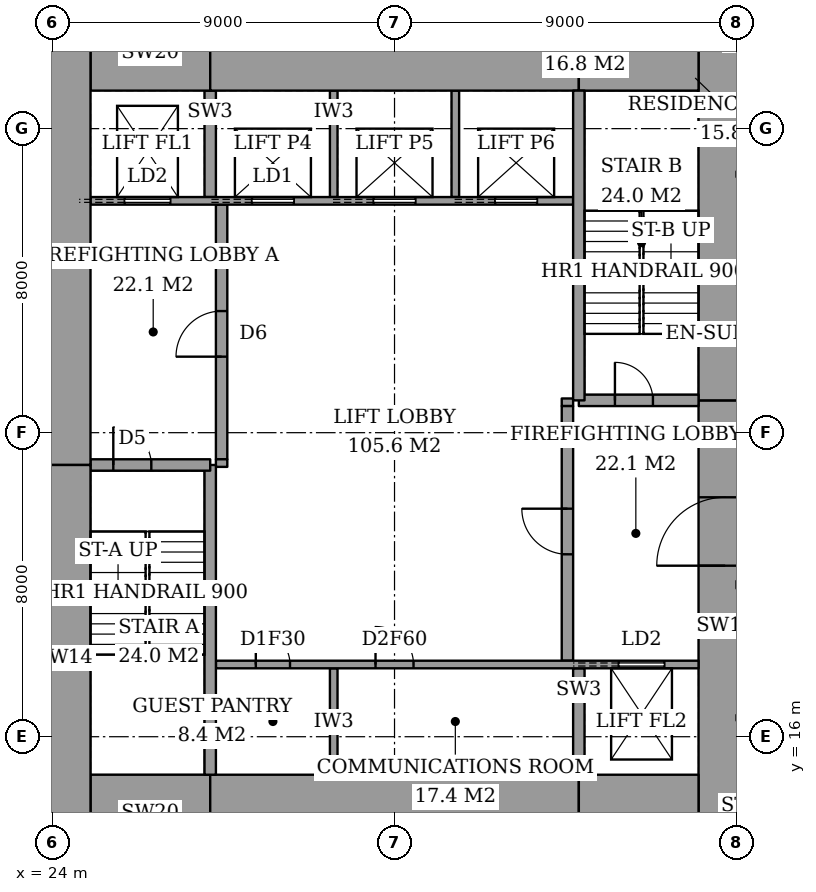
"""IFC4 building model, lengths in metres.
Left out: names, types, materials, properties, quantities, classifications, styles, units other than length and angle.
Written with IfcOpenShell. Run it as: python <this file> out.ifc"""

import sys

from ifc_helpers import new_model, si_unit, direction, frame, frame_2d, origin, place, context, subcontext, project, spatial, rectangle, extrude, element, fill, save


model = new_model("IFC4")
c1 = context("Model", 3, precision=1e-05, world=origin(), true_north=direction((0.0, 1.0)))
c2 = subcontext(c1, "Body", "Model", "MODEL_VIEW")
j1 = project(units=[si_unit("LENGTHUNIT", "METRE"), si_unit("PLANEANGLEUNIT", "RADIAN")], contexts=[c1])
p1 = place(None, origin())
s1 = spatial("IfcSite", under=j1, at=p1, CompositionType="ELEMENT")
p2 = place(p1, origin())
s2 = spatial("IfcBuilding", under=s1, at=p2, CompositionType="ELEMENT")
p3 = place(p2, frame((0.0, 0.0, 282.6)))
s3 = spatial("IfcBuildingStorey", under=s2, at=p3, CompositionType="ELEMENT", Elevation=282.6)
p4 = place(p3, frame((25.0, 14.0, 0.0), z_axis=(0.0, 0.0, 1.0), x_axis=(1.0, 0.0, 0.0)))
e1 = element("IfcWall", 1, at=p4, inside=s3, PredefinedType="SHEAR", context=c2, shape_type="SweptSolid", body=[
    extrude(rectangle(XDim=3.15, YDim=2.0, at=frame_2d((1.575, 0.0))), origin(), (0.0, 0.0, 1.0), 4.5),
])
p5 = place(p3, frame((28.15, 14.0, 0.0), z_axis=(0.0, 0.0, 1.0), x_axis=(1.0, 0.0, 0.0)))
e2 = element("IfcWall", 2, at=p5, inside=s3, PredefinedType="SHEAR", context=c2, shape_type="SweptSolid", body=[
    extrude(rectangle(XDim=9.7, YDim=2.0, at=frame_2d((4.85, 0.0))), origin(), (0.0, 0.0, 1.0), 4.5),
])
for number, where, z_axis, x_axis in (
    (3, (37.85, 14.0, 0.0), (0.0, 0.0, 1.0), (1.0, 0.0, 0.0)),
    (4, (25.0, 34.0, 0.0), (0.0, 0.0, 1.0), (1.0, 0.0, 0.0)),
):
    element("IfcWall", number, at=place(p3, frame(where, z_axis=z_axis, x_axis=x_axis)), inside=s3, PredefinedType="SHEAR", context=c2, shape_type="SweptSolid", body=[
        extrude(rectangle(XDim=3.15, YDim=2.0, at=frame_2d((1.575, 0.0))), origin(), (0.0, 0.0, 1.0), 4.5),
    ])
p6 = place(p3, frame((28.15, 34.0, 0.0), z_axis=(0.0, 0.0, 1.0), x_axis=(1.0, 0.0, 0.0)))
e5 = element("IfcWall", 5, at=p6, inside=s3, PredefinedType="SHEAR", context=c2, shape_type="SweptSolid", body=[
    extrude(rectangle(XDim=9.7, YDim=2.0, at=frame_2d((4.85, 0.0))), origin(), (0.0, 0.0, 1.0), 4.5),
])
p7 = place(p3, frame((37.85, 34.0, 0.0), z_axis=(0.0, 0.0, 1.0), x_axis=(1.0, 0.0, 0.0)))
e6 = element("IfcWall", 6, at=p7, inside=s3, PredefinedType="SHEAR", context=c2, shape_type="SweptSolid", body=[
    extrude(rectangle(XDim=3.15, YDim=2.0, at=frame_2d((1.575, 0.0))), origin(), (0.0, 0.0, 1.0), 4.5),
])
p8 = place(p3, frame((24.3, 13.0, 0.0), z_axis=(0.0, 0.0, 1.0), x_axis=(0.0, 1.0, 0.0)))
e7 = element("IfcWall", 7, at=p8, inside=s3, PredefinedType="SHEAR", context=c2, shape_type="SweptSolid", body=[
    extrude(rectangle(XDim=10.15, YDim=1.4, at=frame_2d((5.075, 0.0))), origin(), (0.0, 0.0, 1.0), 4.5),
])
p9 = place(p3, frame((24.3, 23.15, 0.0), z_axis=(0.0, 0.0, 1.0), x_axis=(0.0, 1.0, 0.0)))
e8 = element("IfcWall", 8, at=p9, inside=s3, PredefinedType="SHEAR", context=c2, shape_type="SweptSolid", body=[
    extrude(rectangle(XDim=11.85, YDim=1.4, at=frame_2d((5.925, 0.0))), origin(), (0.0, 0.0, 1.0), 4.5),
])
p10 = place(p3, frame((41.7, 13.0, 0.0), z_axis=(0.0, 0.0, 1.0), x_axis=(0.0, 1.0, 0.0)))
e9 = element("IfcWall", 9, at=p10, inside=s3, PredefinedType="SHEAR", context=c2, shape_type="SweptSolid", body=[
    extrude(rectangle(XDim=11.85, YDim=1.4, at=frame_2d((5.925, 0.0))), origin(), (0.0, 0.0, 1.0), 4.5),
])
p11 = place(p10, frame((7.5, 0.0, 0.0)))
e10 = element("IfcOpeningElement", 10, at=p11, cuts=e9, PredefinedType="OPENING", context=c2, shape_type="SweptSolid", body=[
    extrude(rectangle(XDim=1.8, YDim=2.4, at=frame_2d((0.9, 1.2))), frame((0.0, 0.71, 0.0), z_axis=(0.0, -1.0, 0.0), x_axis=(1.0, 0.0, 0.0)), (0.0, 0.0, 1.0), 1.42),
])
p12 = place(p3, frame((41.7, 24.85, 0.0), z_axis=(0.0, 0.0, 1.0), x_axis=(0.0, 1.0, 0.0)))
e11 = element("IfcWall", 11, at=p12, inside=s3, PredefinedType="SHEAR", context=c2, shape_type="SweptSolid", body=[
    extrude(rectangle(XDim=10.15, YDim=1.4, at=frame_2d((5.075, 0.0))), origin(), (0.0, 0.0, 1.0), 4.5),
])
p13 = place(p3, frame((28.15, 15.0, 0.0), z_axis=(0.0, 0.0, 1.0), x_axis=(0.0, 1.0, 0.0)))
e12 = element("IfcWall", 12, at=p13, inside=s3, PredefinedType="SHEAR", context=c2, shape_type="SweptSolid", body=[
    extrude(rectangle(XDim=8.15, YDim=0.3, at=frame_2d((4.075, 0.0))), origin(), (0.0, 0.0, 1.0), 4.5),
])
p14 = place(p3, frame((25.0, 23.15, 0.0), z_axis=(0.0, 0.0, 1.0), x_axis=(1.0, 0.0, 0.0)))
e13 = element("IfcWall", 13, at=p14, inside=s3, PredefinedType="SHEAR", context=c2, shape_type="SweptSolid", body=[
    extrude(rectangle(XDim=3.15, YDim=0.3, at=frame_2d((1.575, 0.0))), origin(), (0.0, 0.0, 1.0), 4.5),
])
p15 = place(p14, frame((0.6, 0.0, 0.0)))
e14 = element("IfcOpeningElement", 14, at=p15, cuts=e13, PredefinedType="OPENING", context=c2, shape_type="SweptSolid", body=[
    extrude(rectangle(XDim=1.0, YDim=2.1, at=frame_2d((0.5, 1.05))), frame((0.0, 0.16, 0.0), z_axis=(0.0, -1.0, 0.0), x_axis=(1.0, 0.0, 0.0)), (0.0, 0.0, 1.0), 0.32),
])
p16 = place(p3, frame((37.85, 24.85, 0.0), z_axis=(0.0, 0.0, 1.0), x_axis=(0.0, 1.0, 0.0)))
e15 = element("IfcWall", 15, at=p16, inside=s3, PredefinedType="SHEAR", context=c2, shape_type="SweptSolid", body=[
    extrude(rectangle(XDim=8.15, YDim=0.3, at=frame_2d((4.075, 0.0))), origin(), (0.0, 0.0, 1.0), 4.5),
])
p17 = place(p3, frame((37.85, 24.85, 0.0), z_axis=(0.0, 0.0, 1.0), x_axis=(1.0, 0.0, 0.0)))
e16 = element("IfcWall", 16, at=p17, inside=s3, PredefinedType="SHEAR", context=c2, shape_type="SweptSolid", body=[
    extrude(rectangle(XDim=3.15, YDim=0.3, at=frame_2d((1.575, 0.0))), origin(), (0.0, 0.0, 1.0), 4.5),
])
p18 = place(p17, frame((0.95, 0.0, 0.0)))
e17 = element("IfcOpeningElement", 17, at=p18, cuts=e16, PredefinedType="OPENING", context=c2, shape_type="SweptSolid", body=[
    extrude(rectangle(XDim=1.0, YDim=2.1, at=frame_2d((0.5, 1.05))), frame((0.0, 0.16, 0.0), z_axis=(0.0, -1.0, 0.0), x_axis=(1.0, 0.0, 0.0)), (0.0, 0.0, 1.0), 0.32),
])
p19 = place(p3, frame((28.45, 23.3, 0.0), z_axis=(0.0, 0.0, 1.0), x_axis=(0.0, 1.0, 0.0)))
e18 = element("IfcWall", 18, at=p19, inside=s3, PredefinedType="PARTITIONING", context=c2, shape_type="SweptSolid", body=[
    extrude(rectangle(XDim=6.7, YDim=0.3, at=frame_2d((3.35, 0.0))), origin(), (0.0, 0.0, 1.0), 4.5),
])
p20 = place(p19, frame((2.7, 0.0, 0.0)))
e19 = element("IfcOpeningElement", 19, at=p20, cuts=e18, PredefinedType="OPENING", context=c2, shape_type="SweptSolid", body=[
    extrude(rectangle(XDim=1.2, YDim=2.1, at=frame_2d((0.6, 1.05))), frame((0.0, 0.16, 0.0), z_axis=(0.0, -1.0, 0.0), x_axis=(1.0, 0.0, 0.0)), (0.0, 0.0, 1.0), 0.32),
])
p21 = place(p3, frame((37.55, 18.0, 0.0), z_axis=(0.0, 0.0, 1.0), x_axis=(0.0, 1.0, 0.0)))
e20 = element("IfcWall", 20, at=p21, inside=s3, PredefinedType="PARTITIONING", context=c2, shape_type="SweptSolid", body=[
    extrude(rectangle(XDim=6.7, YDim=0.3, at=frame_2d((3.35, 0.0))), origin(), (0.0, 0.0, 1.0), 4.5),
])
p22 = place(p21, frame((2.8, 0.0, 0.0)))
e21 = element("IfcOpeningElement", 21, at=p22, cuts=e20, PredefinedType="OPENING", context=c2, shape_type="SweptSolid", body=[
    extrude(rectangle(XDim=1.2, YDim=2.1, at=frame_2d((0.6, 1.05))), frame((0.0, 0.16, 0.0), z_axis=(0.0, -1.0, 0.0), x_axis=(1.0, 0.0, 0.0)), (0.0, 0.0, 1.0), 0.32),
])
p23 = place(p3, frame((28.3, 17.9, 0.0), z_axis=(0.0, 0.0, 1.0), x_axis=(1.0, 0.0, 0.0)))
e22 = element("IfcWall", 22, at=p23, inside=s3, PredefinedType="PARTITIONING", context=c2, shape_type="SweptSolid", body=[
    extrude(rectangle(XDim=12.7, YDim=0.2, at=frame_2d((6.35, 0.0))), origin(), (0.0, 0.0, 1.0), 4.5),
])
p24 = place(p23, frame((1.05, 0.0, 0.0)))
e23 = element("IfcOpeningElement", 23, at=p24, cuts=e22, PredefinedType="OPENING", context=c2, shape_type="SweptSolid", body=[
    extrude(rectangle(XDim=0.9, YDim=2.1, at=frame_2d((0.45, 1.05))), frame((0.0, 0.11, 0.0), z_axis=(0.0, -1.0, 0.0), x_axis=(1.0, 0.0, 0.0)), (0.0, 0.0, 1.0), 0.22),
])
p25 = place(p23, frame((4.2, 0.0, 0.0)))
e24 = element("IfcOpeningElement", 24, at=p25, cuts=e22, PredefinedType="OPENING", context=c2, shape_type="SweptSolid", body=[
    extrude(rectangle(XDim=1.0, YDim=2.1, at=frame_2d((0.5, 1.05))), frame((0.0, 0.11, 0.0), z_axis=(0.0, -1.0, 0.0), x_axis=(1.0, 0.0, 0.0)), (0.0, 0.0, 1.0), 0.22),
])
p26 = place(p23, frame((10.6, 0.0, 0.0)))
e25 = element("IfcOpeningElement", 25, at=p26, cuts=e22, PredefinedType="OPENING", context=c2, shape_type="SweptSolid", body=[
    extrude(rectangle(XDim=1.2, YDim=2.1, at=frame_2d((0.6, 1.05))), frame((0.0, 0.11, 0.0), z_axis=(0.0, -1.0, 0.0), x_axis=(1.0, 0.0, 0.0)), (0.0, 0.0, 1.0), 0.22),
])
p27 = place(p3, frame((25.0, 30.1, 0.0), z_axis=(0.0, 0.0, 1.0), x_axis=(1.0, 0.0, 0.0)))
e26 = element("IfcWall", 26, at=p27, inside=s3, PredefinedType="PARTITIONING", context=c2, shape_type="SweptSolid", body=[
    extrude(rectangle(XDim=12.7, YDim=0.2, at=frame_2d((6.35, 0.0))), origin(), (0.0, 0.0, 1.0), 4.5),
])
p28 = place(p27, frame((4.25, 0.0, 0.0)))
e27 = element("IfcOpeningElement", 27, at=p28, cuts=e26, PredefinedType="OPENING", context=c2, shape_type="SweptSolid", body=[
    extrude(rectangle(XDim=1.1, YDim=2.1, at=frame_2d((0.55, 1.05))), frame((0.0, 0.11, 0.0), z_axis=(0.0, -1.0, 0.0), x_axis=(1.0, 0.0, 0.0)), (0.0, 0.0, 1.0), 0.22),
])
p29 = place(p27, frame((7.45, 0.0, 0.0)))
e28 = element("IfcOpeningElement", 28, at=p29, cuts=e26, PredefinedType="OPENING", context=c2, shape_type="SweptSolid", body=[
    extrude(rectangle(XDim=1.1, YDim=2.1, at=frame_2d((0.55, 1.05))), frame((0.0, 0.11, 0.0), z_axis=(0.0, -1.0, 0.0), x_axis=(1.0, 0.0, 0.0)), (0.0, 0.0, 1.0), 0.22),
])
p30 = place(p27, frame((10.65, 0.0, 0.0)))
e29 = element("IfcOpeningElement", 29, at=p30, cuts=e26, PredefinedType="OPENING", context=c2, shape_type="SweptSolid", body=[
    extrude(rectangle(XDim=1.1, YDim=2.1, at=frame_2d((0.55, 1.05))), frame((0.0, 0.11, 0.0), z_axis=(0.0, -1.0, 0.0), x_axis=(1.0, 0.0, 0.0)), (0.0, 0.0, 1.0), 0.22),
])
p31 = place(p27, frame((0.9, 0.0, 0.0)))
e30 = element("IfcOpeningElement", 30, at=p31, cuts=e26, PredefinedType="OPENING", context=c2, shape_type="SweptSolid", body=[
    extrude(rectangle(XDim=1.2, YDim=2.1, at=frame_2d((0.6, 1.05))), frame((0.0, 0.11, 0.0), z_axis=(0.0, -1.0, 0.0), x_axis=(1.0, 0.0, 0.0)), (0.0, 0.0, 1.0), 0.22),
])
p32 = place(p3, frame((31.4, 15.0, 0.0), z_axis=(0.0, 0.0, 1.0), x_axis=(0.0, 1.0, 0.0)))
e31 = element("IfcWall", 31, at=p32, inside=s3, PredefinedType="PARTITIONING", context=c2, shape_type="SweptSolid", body=[
    extrude(rectangle(XDim=2.8, YDim=0.2, at=frame_2d((1.4, 0.0))), origin(), (0.0, 0.0, 1.0), 4.5),
])
p33 = place(p3, frame((37.85, 15.0, 0.0), z_axis=(0.0, 0.0, 1.0), x_axis=(0.0, 1.0, 0.0)))
e32 = element("IfcWall", 32, at=p33, inside=s3, PredefinedType="SHEAR", context=c2, shape_type="SweptSolid", body=[
    extrude(rectangle(XDim=2.8, YDim=0.3, at=frame_2d((1.4, 0.0))), origin(), (0.0, 0.0, 1.0), 4.5),
])
for number, where, z_axis, x_axis in (
    (33, (31.4, 30.2, 0.0), (0.0, 0.0, 1.0), (0.0, 1.0, 0.0)),
    (34, (34.6, 30.2, 0.0), (0.0, 0.0, 1.0), (0.0, 1.0, 0.0)),
):
    element("IfcWall", number, at=place(p3, frame(where, z_axis=z_axis, x_axis=x_axis)), inside=s3, PredefinedType="PARTITIONING", context=c2, shape_type="SweptSolid", body=[
        extrude(rectangle(XDim=2.8, YDim=0.2, at=frame_2d((1.4, 0.0))), origin(), (0.0, 0.0, 1.0), 4.5),
    ])
p34 = place(p3, frame((28.15, 30.2, 0.0), z_axis=(0.0, 0.0, 1.0), x_axis=(0.0, 1.0, 0.0)))
e35 = element("IfcWall", 35, at=p34, inside=s3, PredefinedType="SHEAR", context=c2, shape_type="SweptSolid", body=[
    extrude(rectangle(XDim=2.8, YDim=0.3, at=frame_2d((1.4, 0.0))), origin(), (0.0, 0.0, 1.0), 4.5),
])
for number, where, z_axis, x_axis in (
    (36, (28.3, 23.2, 0.0), (0.0, 0.0, 1.0), (1.0, 0.0, 0.0)),
    (37, (37.4, 24.8, 0.0), (0.0, 0.0, 1.0), (1.0, 0.0, 0.0)),
):
    element("IfcWall", number, at=place(p3, frame(where, z_axis=z_axis, x_axis=x_axis)), inside=s3, PredefinedType="PARTITIONING", context=c2, shape_type="SweptSolid", body=[
        extrude(rectangle(XDim=0.3, YDim=0.2, at=frame_2d((0.15, 0.0))), origin(), (0.0, 0.0, 1.0), 4.5),
    ])
p35 = place(p15, origin())
e38 = element("IfcDoor", 38, at=p35, inside=s3, OperationType="SINGLE_SWING_RIGHT", PredefinedType="DOOR", context=c2, shape_type="SweptSolid", body=[
    extrude(rectangle(XDim=1.0, YDim=2.1, at=frame_2d((0.5, 1.05))), frame((0.0, 0.025, 0.0), z_axis=(0.0, -1.0, 0.0), x_axis=(1.0, 0.0, 0.0)), (0.0, 0.0, 1.0), 0.05),
])
fill(e14, e38)
p36 = place(p18, origin())
e39 = element("IfcDoor", 39, at=p36, inside=s3, OperationType="SINGLE_SWING_RIGHT", PredefinedType="DOOR", context=c2, shape_type="SweptSolid", body=[
    extrude(rectangle(XDim=1.0, YDim=2.1, at=frame_2d((0.5, 1.05))), frame((0.0, 0.025, 0.0), z_axis=(0.0, -1.0, 0.0), x_axis=(1.0, 0.0, 0.0)), (0.0, 0.0, 1.0), 0.05),
])
fill(e17, e39)
p37 = place(p20, origin())
e40 = element("IfcDoor", 40, at=p37, inside=s3, OperationType="SINGLE_SWING_RIGHT", PredefinedType="DOOR", context=c2, shape_type="SweptSolid", body=[
    extrude(rectangle(XDim=1.2, YDim=2.1, at=frame_2d((0.6, 1.05))), frame((0.0, 0.025, 0.0), z_axis=(0.0, -1.0, 0.0), x_axis=(1.0, 0.0, 0.0)), (0.0, 0.0, 1.0), 0.05),
])
fill(e19, e40)
p38 = place(p22, origin())
e41 = element("IfcDoor", 41, at=p38, inside=s3, OperationType="SINGLE_SWING_LEFT", PredefinedType="DOOR", context=c2, shape_type="SweptSolid", body=[
    extrude(rectangle(XDim=1.2, YDim=2.1, at=frame_2d((0.6, 1.05))), frame((0.0, 0.025, 0.0), z_axis=(0.0, -1.0, 0.0), x_axis=(1.0, 0.0, 0.0)), (0.0, 0.0, 1.0), 0.05),
])
fill(e21, e41)
p39 = place(p11, origin())
e42 = element("IfcDoor", 42, at=p39, inside=s3, OperationType="DOUBLE_DOOR_DOUBLE_SWING", PredefinedType="DOOR", context=c2, shape_type="SweptSolid", body=[
    extrude(rectangle(XDim=1.8, YDim=2.4, at=frame_2d((0.9, 1.2))), frame((0.0, 0.025, 0.0), z_axis=(0.0, -1.0, 0.0), x_axis=(1.0, 0.0, 0.0)), (0.0, 0.0, 1.0), 0.05),
])
fill(e10, e42)
p40 = place(p24, origin())
e43 = element("IfcDoor", 43, at=p40, inside=s3, OperationType="SINGLE_SWING_RIGHT", PredefinedType="DOOR", context=c2, shape_type="SweptSolid", body=[
    extrude(rectangle(XDim=0.9, YDim=2.1, at=frame_2d((0.45, 1.05))), frame((0.0, 0.025, 0.0), z_axis=(0.0, -1.0, 0.0), x_axis=(1.0, 0.0, 0.0)), (0.0, 0.0, 1.0), 0.05),
])
fill(e23, e43)
p41 = place(p25, origin())
e44 = element("IfcDoor", 44, at=p41, inside=s3, OperationType="SINGLE_SWING_RIGHT", PredefinedType="DOOR", context=c2, shape_type="SweptSolid", body=[
    extrude(rectangle(XDim=1.0, YDim=2.1, at=frame_2d((0.5, 1.05))), frame((0.0, 0.025, 0.0), z_axis=(0.0, -1.0, 0.0), x_axis=(1.0, 0.0, 0.0)), (0.0, 0.0, 1.0), 0.05),
])
fill(e24, e44)
p42 = place(p28, origin())
e45 = element("IfcDoor", 45, at=p42, inside=s3, OperationType="SLIDING_TO_LEFT", PredefinedType="DOOR", context=c2, shape_type="SweptSolid", body=[
    extrude(rectangle(XDim=1.1, YDim=2.1, at=frame_2d((0.55, 1.05))), frame((0.0, 0.025, 0.0), z_axis=(0.0, -1.0, 0.0), x_axis=(1.0, 0.0, 0.0)), (0.0, 0.0, 1.0), 0.05),
])
fill(e27, e45)
p43 = place(p29, origin())
e46 = element("IfcDoor", 46, at=p43, inside=s3, OperationType="SLIDING_TO_LEFT", PredefinedType="DOOR", context=c2, shape_type="SweptSolid", body=[
    extrude(rectangle(XDim=1.1, YDim=2.1, at=frame_2d((0.55, 1.05))), frame((0.0, 0.025, 0.0), z_axis=(0.0, -1.0, 0.0), x_axis=(1.0, 0.0, 0.0)), (0.0, 0.0, 1.0), 0.05),
])
fill(e28, e46)
p44 = place(p30, origin())
e47 = element("IfcDoor", 47, at=p44, inside=s3, OperationType="SLIDING_TO_LEFT", PredefinedType="DOOR", context=c2, shape_type="SweptSolid", body=[
    extrude(rectangle(XDim=1.1, YDim=2.1, at=frame_2d((0.55, 1.05))), frame((0.0, 0.025, 0.0), z_axis=(0.0, -1.0, 0.0), x_axis=(1.0, 0.0, 0.0)), (0.0, 0.0, 1.0), 0.05),
])
fill(e29, e47)
p45 = place(p31, origin())
e48 = element("IfcDoor", 48, at=p45, inside=s3, OperationType="SLIDING_TO_LEFT", PredefinedType="DOOR", context=c2, shape_type="SweptSolid", body=[
    extrude(rectangle(XDim=1.2, YDim=2.1, at=frame_2d((0.6, 1.05))), frame((0.0, 0.025, 0.0), z_axis=(0.0, -1.0, 0.0), x_axis=(1.0, 0.0, 0.0)), (0.0, 0.0, 1.0), 0.05),
])
fill(e30, e48)
p46 = place(p26, origin())
e49 = element("IfcDoor", 49, at=p46, inside=s3, OperationType="SLIDING_TO_LEFT", PredefinedType="DOOR", context=c2, shape_type="SweptSolid", body=[
    extrude(rectangle(XDim=1.2, YDim=2.1, at=frame_2d((0.6, 1.05))), frame((0.0, 0.025, 0.0), z_axis=(0.0, -1.0, 0.0), x_axis=(1.0, 0.0, 0.0)), (0.0, 0.0, 1.0), 0.05),
])
fill(e25, e49)
save(model, sys.argv[1])
